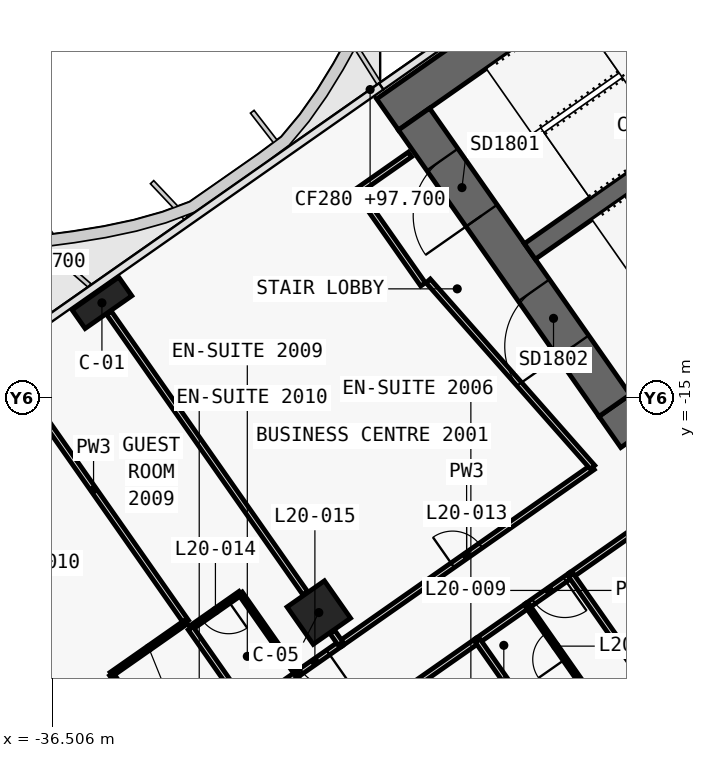
"""IFC4 building model, lengths in metres.
Left out: names, types, materials, properties, quantities, classifications, styles, units other than length and angle.
Written with IfcOpenShell. Run it as: python <this file> out.ifc"""

import sys

from ifc_helpers import new_model, si_unit, direction, frame, frame_2d, origin, origin_2d, place, context, subcontext, project, spatial, polyline, rectangle, outline, extrude, element, fill, save


model = new_model("IFC4")
c1 = context("Model", 3, precision=1e-05, world=origin(), true_north=direction((0.0, 1.0)))
c2 = subcontext(c1, "Body", "Model", "MODEL_VIEW")
j1 = project(units=[si_unit("LENGTHUNIT", "METRE"), si_unit("PLANEANGLEUNIT", "RADIAN")], contexts=[c1])
p1 = place(None, origin())
s1 = spatial("IfcSite", under=j1, at=p1, CompositionType="ELEMENT")
p2 = place(p1, origin())
s2 = spatial("IfcBuilding", under=s1, at=p2, CompositionType="ELEMENT")
p3 = place(p2, frame((0.0, 0.0, 97.7)))
s3 = spatial("IfcBuildingStorey", under=s2, at=p3, CompositionType="ELEMENT", Elevation=97.7)
p4 = place(p3, frame((0.037, 11.867, 0.0), z_axis=(0.0, 0.0, 1.0), x_axis=(-0.819155306259, -0.573571777746, 0.0)))
e1 = element("IfcWall", 1, at=p4, inside=s3, PredefinedType="SHEAR", context=c2, shape_type="SweptSolid", body=[
    extrude(outline(polyline([(33.837, 0.5), (0.7, 0.5), (0.0, -0.5), (33.837, -0.5), (33.837, 0.5)])), origin(), (0.0, 0.0, 1.0), 3.6),
])
p5 = place(p3, frame((0.037, -0.585, 0.0), z_axis=(0.0, 0.0, 1.0), x_axis=(-0.819157152511, -0.573569140985, 0.0)))
e2 = element("IfcWall", 2, at=p5, inside=s3, PredefinedType="SHEAR", context=c2, shape_type="SweptSolid", body=[
    extrude(outline(polyline([(26.695, 0.5), (0.7, 0.5), (0.0, -0.5), (26.695, -0.5), (26.695, 0.5)])), origin(), (0.0, 0.0, 1.0), 3.6),
])
p6 = place(p5, frame((2.995, 0.0, 0.0)))
e3 = element("IfcOpeningElement", 3, at=p6, cuts=e2, PredefinedType="OPENING", context=c2, shape_type="SweptSolid", body=[
    extrude(rectangle(XDim=2.4, YDim=2.1, at=frame_2d((1.2, 1.05))), frame((0.0, 0.51, 0.0), z_axis=(0.0, -1.0, 0.0), x_axis=(1.0, 0.0, 0.0)), (0.0, 0.0, 1.0), 1.02),
])
p7 = place(p5, frame((11.995, 0.0, 0.0)))
e4 = element("IfcOpeningElement", 4, at=p7, cuts=e2, PredefinedType="OPENING", context=c2, shape_type="SweptSolid", body=[
    extrude(rectangle(XDim=2.4, YDim=2.1, at=frame_2d((1.2, 1.05))), frame((0.0, 0.51, 0.0), z_axis=(0.0, -1.0, 0.0), x_axis=(1.0, 0.0, 0.0)), (0.0, 0.0, 1.0), 1.02),
])
p8 = place(p3, frame((-21.708, -15.2, 0.0), z_axis=(0.0, 0.0, 1.0), x_axis=(-0.573576324356, 0.819152122709, 0.0)))
e5 = element("IfcWall", 5, at=p8, inside=s3, PredefinedType="SHEAR", context=c2, shape_type="SweptSolid", body=[
    extrude(outline(polyline([(0.0, 0.5), (0.0, -0.5), (9.2, -0.5), (9.2, 0.5), (0.0, 0.5)])), origin(), (0.0, 0.0, 1.0), 3.6),
])
p9 = place(p8, frame((6.1, 0.0, 0.0)))
e6 = element("IfcOpeningElement", 6, at=p9, cuts=e5, PredefinedType="OPENING", context=c2, shape_type="SweptSolid", body=[
    extrude(rectangle(XDim=1.8, YDim=2.1, at=frame_2d((0.9, 1.05))), frame((0.0, 0.51, 0.0), z_axis=(0.0, -1.0, 0.0), x_axis=(1.0, 0.0, 0.0)), (0.0, 0.0, 1.0), 1.02),
])
p10 = place(p8, frame((1.9, 0.0, 0.0)))
e7 = element("IfcOpeningElement", 7, at=p10, cuts=e5, PredefinedType="OPENING", context=c2, shape_type="SweptSolid", body=[
    extrude(rectangle(XDim=1.8, YDim=2.1, at=frame_2d((0.9, 1.05))), frame((0.0, 0.51, 0.0), z_axis=(0.0, -1.0, 0.0), x_axis=(1.0, 0.0, 0.0)), (0.0, 0.0, 1.0), 1.02),
])
p11 = place(p3, frame((-2.638, 3.768, 0.0), z_axis=(0.0, 0.0, 1.0), x_axis=(-0.819148977158, -0.573580816643, 0.0)))
e8 = element("IfcWall", 8, at=p11, inside=s3, PredefinedType="SHEAR", context=c2, shape_type="SweptSolid", body=[
    extrude(outline(polyline([(26.0, 0.25), (0.0, 0.25), (0.0, -0.25), (26.0, -0.25), (26.0, 0.25)])), origin(), (0.0, 0.0, 1.0), 3.6),
])
p12 = place(p11, frame((1.169, 0.0, 0.0)))
e9 = element("IfcOpeningElement", 9, at=p12, cuts=e8, PredefinedType="OPENING", context=c2, shape_type="SweptSolid", body=[
    extrude(rectangle(XDim=1.1, YDim=2.1, at=frame_2d((0.55, 1.05))), frame((0.0, 0.26, 0.0), z_axis=(0.0, -1.0, 0.0), x_axis=(1.0, 0.0, 0.0)), (0.0, 0.0, 1.0), 0.52),
])
p13 = place(p11, frame((3.206, 0.0, 0.0)))
e10 = element("IfcOpeningElement", 10, at=p13, cuts=e8, PredefinedType="OPENING", context=c2, shape_type="SweptSolid", body=[
    extrude(rectangle(XDim=1.1, YDim=2.1, at=frame_2d((0.55, 1.05))), frame((0.0, 0.26, 0.0), z_axis=(0.0, -1.0, 0.0), x_axis=(1.0, 0.0, 0.0)), (0.0, 0.0, 1.0), 0.52),
])
p14 = place(p11, frame((5.244, 0.0, 0.0)))
e11 = element("IfcOpeningElement", 11, at=p14, cuts=e8, PredefinedType="OPENING", context=c2, shape_type="SweptSolid", body=[
    extrude(rectangle(XDim=1.1, YDim=2.1, at=frame_2d((0.55, 1.05))), frame((0.0, 0.26, 0.0), z_axis=(0.0, -1.0, 0.0), x_axis=(1.0, 0.0, 0.0)), (0.0, 0.0, 1.0), 0.52),
])
p15 = place(p11, frame((7.281, 0.0, 0.0)))
e12 = element("IfcOpeningElement", 12, at=p15, cuts=e8, PredefinedType="OPENING", context=c2, shape_type="SweptSolid", body=[
    extrude(rectangle(XDim=1.1, YDim=2.1, at=frame_2d((0.55, 1.05))), frame((0.0, 0.26, 0.0), z_axis=(0.0, -1.0, 0.0), x_axis=(1.0, 0.0, 0.0)), (0.0, 0.0, 1.0), 0.52),
])
p16 = place(p11, frame((9.688, 0.0, 0.0)))
e13 = element("IfcOpeningElement", 13, at=p16, cuts=e8, PredefinedType="OPENING", context=c2, shape_type="SweptSolid", body=[
    extrude(rectangle(XDim=1.1, YDim=2.1, at=frame_2d((0.55, 1.05))), frame((0.0, 0.26, 0.0), z_axis=(0.0, -1.0, 0.0), x_axis=(1.0, 0.0, 0.0)), (0.0, 0.0, 1.0), 0.52),
])
p17 = place(p11, frame((11.863, 0.0, 0.0)))
e14 = element("IfcOpeningElement", 14, at=p17, cuts=e8, PredefinedType="OPENING", context=c2, shape_type="SweptSolid", body=[
    extrude(rectangle(XDim=1.1, YDim=2.1, at=frame_2d((0.55, 1.05))), frame((0.0, 0.26, 0.0), z_axis=(0.0, -1.0, 0.0), x_axis=(1.0, 0.0, 0.0)), (0.0, 0.0, 1.0), 0.52),
])
p18 = place(p11, frame((14.038, 0.0, 0.0)))
e15 = element("IfcOpeningElement", 15, at=p18, cuts=e8, PredefinedType="OPENING", context=c2, shape_type="SweptSolid", body=[
    extrude(rectangle(XDim=1.1, YDim=2.1, at=frame_2d((0.55, 1.05))), frame((0.0, 0.26, 0.0), z_axis=(0.0, -1.0, 0.0), x_axis=(1.0, 0.0, 0.0)), (0.0, 0.0, 1.0), 0.52),
])
p19 = place(p11, frame((16.212, 0.0, 0.0)))
e16 = element("IfcOpeningElement", 16, at=p19, cuts=e8, PredefinedType="OPENING", context=c2, shape_type="SweptSolid", body=[
    extrude(rectangle(XDim=1.1, YDim=2.1, at=frame_2d((0.55, 1.05))), frame((0.0, 0.26, 0.0), z_axis=(0.0, -1.0, 0.0), x_axis=(1.0, 0.0, 0.0)), (0.0, 0.0, 1.0), 0.52),
])
p20 = place(p3, frame((-35.197, -12.498, 0.0), z_axis=(0.0, 0.0, 1.0), x_axis=(-0.819152044289, -0.573576436351, 0.0)))
e17 = element("IfcColumn", 17, at=p20, inside=s3, PredefinedType="COLUMN", context=c2, shape_type="SweptSolid", body=[
    extrude(rectangle(XDim=1.5, YDim=0.6, at=origin_2d()), origin(), (0.0, 0.0, 1.0), 3.6),
])
p21 = place(p3, frame((-29.49, -20.649, 0.0), z_axis=(0.0, 0.0, 1.0), x_axis=(-0.819152044289, -0.573576436351, 0.0)))
e18 = element("IfcColumn", 18, at=p21, inside=s3, PredefinedType="COLUMN", context=c2, shape_type="SweptSolid", body=[
    extrude(rectangle(XDim=1.2, YDim=1.2, at=origin_2d()), origin(), (0.0, 0.0, 1.0), 3.6),
])
p22 = place(p3, frame((-28.917, -21.469, 0.0), z_axis=(0.0, 0.0, 1.0), x_axis=(0.819152599934, 0.573575642807, 0.0)))
e19 = element("IfcWall", 19, at=p22, inside=s3, PredefinedType="PARTITIONING", context=c2, shape_type="SweptSolid", body=[
    extrude(rectangle(XDim=8.098, YDim=0.15, at=frame_2d((4.049, 0.0))), origin(), (0.0, 0.0, 1.0), 2.6),
])
p23 = place(p22, frame((3.599, 0.0, 0.0)))
e20 = element("IfcOpeningElement", 20, at=p23, cuts=e19, PredefinedType="OPENING", context=c2, shape_type="SweptSolid", body=[
    extrude(rectangle(XDim=0.9, YDim=2.1, at=frame_2d((0.45, 1.05))), frame((0.0, 0.085, 0.0), z_axis=(0.0, -1.0, 0.0), x_axis=(1.0, 0.0, 0.0)), (0.0, 0.0, 1.0), 0.17),
])
p24 = place(p3, frame((-28.914, -21.467, 0.0), z_axis=(0.0, 0.0, 1.0), x_axis=(-0.81914197737, -0.573590813132, 0.0)))
e21 = element("IfcWall", 21, at=p24, inside=s3, PredefinedType="PARTITIONING", context=c2, shape_type="SweptSolid", body=[
    extrude(rectangle(XDim=1.403, YDim=0.15, at=frame_2d((0.701, 0.0))), origin(), (0.0, 0.0, 1.0), 2.6),
])
p25 = place(p24, frame((0.403, 0.0, 0.0)))
e22 = element("IfcOpeningElement", 22, at=p25, cuts=e21, PredefinedType="OPENING", context=c2, shape_type="SweptSolid", body=[
    extrude(rectangle(XDim=0.85, YDim=2.1, at=frame_2d((0.425, 1.05))), frame((0.0, 0.085, 0.0), z_axis=(0.0, -1.0, 0.0), x_axis=(1.0, 0.0, 0.0)), (0.0, 0.0, 1.0), 0.17),
])
p26 = place(p3, frame((-31.375, -23.19, 0.0), z_axis=(0.0, 0.0, 1.0), x_axis=(0.819189013667, 0.573523634986, 0.0)))
e23 = element("IfcWall", 23, at=p26, inside=s3, PredefinedType="PARTITIONING", context=c2, shape_type="SweptSolid", body=[
    extrude(rectangle(XDim=1.604, YDim=0.15, at=frame_2d((0.802, 0.0))), origin(), (0.0, 0.0, 1.0), 3.32),
])
p27 = place(p3, frame((-17.447, -15.879, 0.0), z_axis=(0.0, 0.0, 1.0), x_axis=(-0.819153746897, -0.573574004767, 0.0)))
e24 = element("IfcWall", 24, at=p27, inside=s3, PredefinedType="PARTITIONING", context=c2, shape_type="SweptSolid", body=[
    extrude(rectangle(XDim=6.603, YDim=0.15, at=frame_2d((3.302, 0.0))), origin(), (0.0, 0.0, 1.0), 2.6),
])
p28 = place(p27, frame((2.801, 0.0, 0.0)))
e25 = element("IfcOpeningElement", 25, at=p28, cuts=e24, PredefinedType="OPENING", context=c2, shape_type="SweptSolid", body=[
    extrude(rectangle(XDim=1.0, YDim=2.1, at=frame_2d((0.5, 1.05))), frame((0.0, 0.085, 0.0), z_axis=(0.0, -1.0, 0.0), x_axis=(1.0, 0.0, 0.0)), (0.0, 0.0, 1.0), 0.17),
])
p29 = place(p3, frame((-22.852, -19.664, 0.0), z_axis=(0.0, 0.0, 1.0), x_axis=(-0.81914197737, -0.573590813132, 0.0)))
e26 = element("IfcWall", 26, at=p29, inside=s3, PredefinedType="PARTITIONING", context=c2, shape_type="SweptSolid", body=[
    extrude(rectangle(XDim=1.403, YDim=0.15, at=frame_2d((0.701, 0.0))), origin(), (0.0, 0.0, 1.0), 3.32),
])
p30 = place(p29, frame((0.202, 0.0, 0.0)))
e27 = element("IfcOpeningElement", 27, at=p30, cuts=e26, PredefinedType="OPENING", context=c2, shape_type="SweptSolid", body=[
    extrude(rectangle(XDim=1.0, YDim=2.1, at=frame_2d((0.5, 1.05))), frame((0.0, 0.085, 0.0), z_axis=(0.0, -1.0, 0.0), x_axis=(1.0, 0.0, 0.0)), (0.0, 0.0, 1.0), 0.17),
])
p31 = place(p3, frame((-23.999, -20.467, 0.0), z_axis=(0.0, 0.0, 1.0), x_axis=(-0.819117502046, -0.573625764625, 0.0)))
e28 = element("IfcWall", 28, at=p31, inside=s3, PredefinedType="PARTITIONING", context=c2, shape_type="SweptSolid", body=[
    extrude(rectangle(XDim=1.604, YDim=0.15, at=frame_2d((0.802, 0.0))), origin(), (0.0, 0.0, 1.0), 3.32),
])
p32 = place(p3, frame((-25.31, -21.384, 0.0), z_axis=(0.0, 0.0, 1.0), x_axis=(-0.819146032251, -0.573585022335, 0.0)))
e29 = element("IfcWall", 29, at=p32, inside=s3, PredefinedType="PARTITIONING", context=c2, shape_type="SweptSolid", body=[
    extrude(rectangle(XDim=2.404, YDim=0.15, at=frame_2d((1.202, 0.0))), origin(), (0.0, 0.0, 1.0), 3.32),
])
p33 = place(p3, frame((-26.746, -12.014, 0.0), z_axis=(0.0, 0.0, 1.0), x_axis=(-0.573560650686, 0.819163097304, 0.0)))
e30 = element("IfcWall", 30, at=p33, inside=s3, PredefinedType="PARTITIONING", context=c2, shape_type="SweptSolid", body=[
    extrude(rectangle(XDim=3.0, YDim=0.15, at=frame_2d((1.5, 0.0))), origin(), (0.0, 0.0, 1.0), 3.32),
])
p34 = place(p3, frame((-28.467, -9.556, 0.0), z_axis=(0.0, 0.0, 1.0), x_axis=(0.819109000826, 0.573637903879, 0.0)))
e31 = element("IfcWall", 31, at=p34, inside=s3, PredefinedType="PARTITIONING", context=c2, shape_type="SweptSolid", body=[
    extrude(rectangle(XDim=1.68, YDim=0.15, at=frame_2d((0.84, 0.0))), origin(), (0.0, 0.0, 1.0), 3.32),
])
p35 = place(p3, frame((-22.284, -16.827, 0.0), z_axis=(0.0, 0.0, 1.0), x_axis=(-0.661545117561, 0.749905365651, 0.0)))
e32 = element("IfcWall", 32, at=p35, inside=s3, PredefinedType="PARTITIONING", context=c2, shape_type="SweptSolid", body=[
    extrude(rectangle(XDim=6.543, YDim=0.15, at=frame_2d((3.271, 0.0))), origin(), (0.0, 0.0, 1.0), 2.6),
])
p36 = place(p3, frame((-28.916, -21.468, 0.0), z_axis=(0.0, 0.0, 1.0), x_axis=(-0.572944929411, 0.819593867633, 0.0)))
e33 = element("IfcWall", 33, at=p36, inside=s3, PredefinedType="PARTITIONING", context=c2, shape_type="SweptSolid", body=[
    extrude(rectangle(XDim=0.38, YDim=0.15, at=frame_2d((0.19, 0.0))), origin(), (0.0, 0.0, 1.0), 2.6),
])
p37 = place(p3, frame((-29.845, -20.141, 0.0), z_axis=(0.0, 0.0, 1.0), x_axis=(-0.573558725113, 0.819164445546, 0.0)))
e34 = element("IfcWall", 34, at=p37, inside=s3, PredefinedType="PARTITIONING", context=c2, shape_type="SweptSolid", body=[
    extrude(rectangle(XDim=9.01, YDim=0.15, at=frame_2d((4.505, 0.0))), origin(), (0.0, 0.0, 1.0), 2.6),
])
p38 = place(p3, frame((-30.062, -22.27, 0.0), z_axis=(0.0, 0.0, 1.0), x_axis=(-0.573537965655, 0.819178980414, 0.0)))
e35 = element("IfcWall", 35, at=p38, inside=s3, PredefinedType="PARTITIONING", context=c2, shape_type="SweptSolid", body=[
    extrude(rectangle(XDim=2.6, YDim=0.12, at=frame_2d((1.3, 0.0))), origin(), (0.0, 0.0, 1.0), 2.6),
])
p39 = place(p3, frame((-31.555, -20.14, 0.0), z_axis=(0.0, 0.0, 1.0), x_axis=(-0.819131543282, -0.57360571371, 0.0)))
e36 = element("IfcWall", 36, at=p39, inside=s3, PredefinedType="PARTITIONING", context=c2, shape_type="SweptSolid", body=[
    extrude(rectangle(XDim=1.6, YDim=0.12, at=frame_2d((0.8, 0.0))), origin(), (0.0, 0.0, 1.0), 3.32),
])
p40 = place(p39, frame((0.375, 0.0, 0.0)))
e37 = element("IfcOpeningElement", 37, at=p40, cuts=e36, PredefinedType="OPENING", context=c2, shape_type="SweptSolid", body=[
    extrude(rectangle(XDim=0.85, YDim=2.05, at=frame_2d((0.425, 1.025))), frame((0.0, 0.07, 0.0), z_axis=(0.0, -1.0, 0.0), x_axis=(1.0, 0.0, 0.0)), (0.0, 0.0, 1.0), 0.14),
])
p41 = place(p3, frame((-32.979, -20.896, 0.0), z_axis=(0.0, 0.0, 1.0), x_axis=(-0.573576058406, 0.819152308929, 0.0)))
e38 = element("IfcWall", 38, at=p41, inside=s3, PredefinedType="PARTITIONING", context=c2, shape_type="SweptSolid", body=[
    extrude(rectangle(XDim=8.501, YDim=0.15, at=frame_2d((4.25, 0.0))), origin(), (0.0, 0.0, 1.0), 2.5),
])
p42 = place(p3, frame((-31.373, -23.189, 0.0), z_axis=(0.0, 0.0, 1.0), x_axis=(-0.573600972199, 0.819134863556, 0.0)))
e39 = element("IfcWall", 39, at=p42, inside=s3, PredefinedType="PARTITIONING", context=c2, shape_type="SweptSolid", body=[
    extrude(rectangle(XDim=2.6, YDim=0.15, at=frame_2d((1.3, 0.0))), origin(), (0.0, 0.0, 1.0), 2.6),
])
p43 = place(p3, frame((-32.98, -20.894, 0.0), z_axis=(0.0, 0.0, 1.0), x_axis=(-0.819155442668, -0.573571582932, 0.0)))
e40 = element("IfcWall", 40, at=p43, inside=s3, PredefinedType="PARTITIONING", context=c2, shape_type="SweptSolid", body=[
    extrude(rectangle(XDim=2.4, YDim=0.12, at=frame_2d((1.2, 0.0))), origin(), (0.0, 0.0, 1.0), 3.32),
])
p44 = place(p3, frame((-34.946, -22.272, 0.0), z_axis=(0.0, 0.0, 1.0), x_axis=(0.573608623498, -0.819129505664, 0.0)))
e41 = element("IfcWall", 41, at=p44, inside=s3, PredefinedType="PARTITIONING", context=c2, shape_type="SweptSolid", body=[
    extrude(rectangle(XDim=2.8, YDim=0.12, at=frame_2d((1.4, 0.0))), origin(), (0.0, 0.0, 1.0), 2.6),
])
p45 = place(p44, frame((0.975, 0.0, 0.0)))
e42 = element("IfcOpeningElement", 42, at=p45, cuts=e41, PredefinedType="OPENING", context=c2, shape_type="SweptSolid", body=[
    extrude(rectangle(XDim=0.85, YDim=2.05, at=frame_2d((0.425, 1.025))), frame((0.0, 0.07, 0.0), z_axis=(0.0, -1.0, 0.0), x_axis=(1.0, 0.0, 0.0)), (0.0, 0.0, 1.0), 0.14),
])
p46 = place(p3, frame((-18.667, -25.645, 0.0), z_axis=(0.0, 0.0, 1.0), x_axis=(-0.573572324301, 0.819154923562, 0.0)))
e43 = element("IfcWall", 43, at=p46, inside=s3, PredefinedType="PARTITIONING", context=c2, shape_type="SweptSolid", body=[
    extrude(rectangle(XDim=7.3, YDim=0.15, at=frame_2d((3.65, 0.0))), origin(), (0.0, 0.0, 1.0), 2.5),
])
p47 = place(p3, frame((-22.509, -22.597, 0.0), z_axis=(0.0, 0.0, 1.0), x_axis=(-0.573582085028, 0.819148089014, 0.0)))
e44 = element("IfcWall", 44, at=p47, inside=s3, PredefinedType="PARTITIONING", context=c2, shape_type="SweptSolid", body=[
    extrude(rectangle(XDim=2.6, YDim=0.12, at=frame_2d((1.3, 0.0))), origin(), (0.0, 0.0, 1.0), 3.32),
])
p48 = place(p47, frame((0.875, 0.0, 0.0)))
e45 = element("IfcOpeningElement", 45, at=p48, cuts=e44, PredefinedType="OPENING", context=c2, shape_type="SweptSolid", body=[
    extrude(rectangle(XDim=0.85, YDim=2.05, at=frame_2d((0.425, 1.025))), frame((0.0, 0.07, 0.0), z_axis=(0.0, -1.0, 0.0), x_axis=(1.0, 0.0, 0.0)), (0.0, 0.0, 1.0), 0.14),
])
p49 = place(p3, frame((-23.82, -23.515, 0.0), z_axis=(0.0, 0.0, 1.0), x_axis=(-0.573537965655, 0.819178980414, 0.0)))
e46 = element("IfcWall", 46, at=p49, inside=s3, PredefinedType="PARTITIONING", context=c2, shape_type="SweptSolid", body=[
    extrude(rectangle(XDim=2.6, YDim=0.15, at=frame_2d((1.3, 0.0))), origin(), (0.0, 0.0, 1.0), 3.32),
])
p50 = place(p9, origin())
e47 = element("IfcDoor", 47, at=p50, inside=s3, OperationType="DOUBLE_DOOR_SINGLE_SWING", PredefinedType="DOOR", context=c2, shape_type="SweptSolid", body=[
    extrude(rectangle(XDim=1.8, YDim=2.1, at=frame_2d((0.9, 1.05))), frame((0.0, 0.025, 0.0), z_axis=(0.0, -1.0, 0.0), x_axis=(1.0, 0.0, 0.0)), (0.0, 0.0, 1.0), 0.05),
])
fill(e6, e47)
p51 = place(p10, origin())
e48 = element("IfcDoor", 48, at=p51, inside=s3, OperationType="DOUBLE_DOOR_SINGLE_SWING", PredefinedType="DOOR", context=c2, shape_type="SweptSolid", body=[
    extrude(rectangle(XDim=1.8, YDim=2.1, at=frame_2d((0.9, 1.05))), frame((0.0, 0.025, 0.0), z_axis=(0.0, -1.0, 0.0), x_axis=(1.0, 0.0, 0.0)), (0.0, 0.0, 1.0), 0.05),
])
fill(e7, e48)
p52 = place(p48, origin())
e49 = element("IfcDoor", 49, at=p52, inside=s3, OperationType="SINGLE_SWING_LEFT", PredefinedType="DOOR", context=c2, shape_type="SweptSolid", body=[
    extrude(rectangle(XDim=0.85, YDim=2.05, at=frame_2d((0.425, 1.025))), frame((0.0, 0.025, 0.0), z_axis=(0.0, -1.0, 0.0), x_axis=(1.0, 0.0, 0.0)), (0.0, 0.0, 1.0), 0.05),
])
fill(e45, e49)
p53 = place(p30, origin())
e50 = element("IfcDoor", 50, at=p53, inside=s3, OperationType="SINGLE_SWING_RIGHT", PredefinedType="DOOR", context=c2, shape_type="SweptSolid", body=[
    extrude(rectangle(XDim=1.0, YDim=2.1, at=frame_2d((0.5, 1.05))), frame((0.0, 0.025, 0.0), z_axis=(0.0, -1.0, 0.0), x_axis=(1.0, 0.0, 0.0)), (0.0, 0.0, 1.0), 0.05),
])
fill(e27, e50)
p54 = place(p23, origin())
e51 = element("IfcDoor", 51, at=p54, inside=s3, OperationType="SINGLE_SWING_LEFT", PredefinedType="DOOR", context=c2, shape_type="SweptSolid", body=[
    extrude(rectangle(XDim=0.9, YDim=2.1, at=frame_2d((0.45, 1.05))), frame((0.0, 0.025, 0.0), z_axis=(0.0, -1.0, 0.0), x_axis=(1.0, 0.0, 0.0)), (0.0, 0.0, 1.0), 0.05),
])
fill(e20, e51)
p55 = place(p40, origin())
e52 = element("IfcDoor", 52, at=p55, inside=s3, OperationType="SINGLE_SWING_RIGHT", PredefinedType="DOOR", context=c2, shape_type="SweptSolid", body=[
    extrude(rectangle(XDim=0.85, YDim=2.05, at=frame_2d((0.425, 1.025))), frame((0.0, 0.025, 0.0), z_axis=(0.0, -1.0, 0.0), x_axis=(1.0, 0.0, 0.0)), (0.0, 0.0, 1.0), 0.05),
])
fill(e37, e52)
p56 = place(p25, origin())
e53 = element("IfcDoor", 53, at=p56, inside=s3, OperationType="SINGLE_SWING_LEFT", PredefinedType="DOOR", context=c2, shape_type="SweptSolid", body=[
    extrude(rectangle(XDim=0.85, YDim=2.1, at=frame_2d((0.425, 1.05))), frame((0.0, 0.025, 0.0), z_axis=(0.0, -1.0, 0.0), x_axis=(1.0, 0.0, 0.0)), (0.0, 0.0, 1.0), 0.05),
])
fill(e22, e53)
save(model, sys.argv[1])
